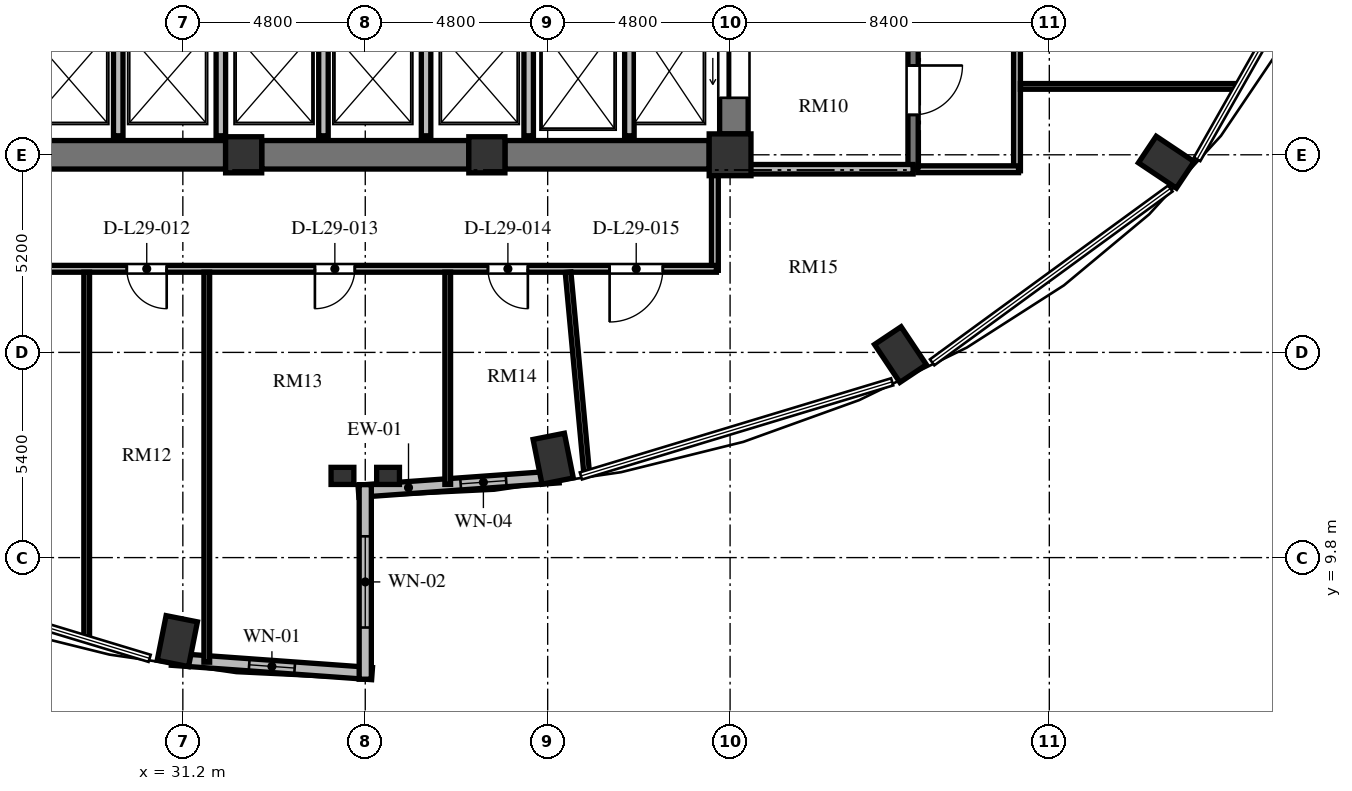
"""IFC4 building model, lengths in metres.
Left out: names, types, materials, properties, quantities, classifications, styles, units other than length and angle.
Written with IfcOpenShell. Run it as: python <this file> out.ifc"""

import sys

from ifc_helpers import new_model, si_unit, direction, frame, frame_2d, origin, origin_2d, place, context, subcontext, project, spatial, rectangle, extrude, element, fill, save


model = new_model("IFC4")
c1 = context("Model", 3, precision=1e-05, world=origin(), true_north=direction((0.0, 1.0)))
c2 = subcontext(c1, "Body", "Model", "MODEL_VIEW")
j1 = project(units=[si_unit("LENGTHUNIT", "METRE"), si_unit("PLANEANGLEUNIT", "RADIAN")], contexts=[c1])
p1 = place(None, origin())
s1 = spatial("IfcSite", under=j1, at=p1, CompositionType="ELEMENT")
p2 = place(p1, origin())
s2 = spatial("IfcBuilding", under=s1, at=p2, CompositionType="ELEMENT")
p3 = place(p2, frame((0.0, 0.0, 114.576)))
s3 = spatial("IfcBuildingStorey", under=s2, at=p3, CompositionType="ELEMENT", Elevation=114.576)
for number, where, z_axis, x_axis in (
    (1, (40.946, 12.403, 0.0), (0.0, 0.0, 1.0), (0.195, -0.981, 0.0)),
    (2, (50.084, 15.143, 0.0), (0.0, 0.0, 1.0), (0.556, -0.831, 0.0)),
    (3, (57.078, 20.205, 0.0), (0.0, 0.0, 1.0), (0.831, -0.556, 0.0)),
    (4, (31.054, 7.603, 0.0), (0.0, 0.0, 1.0), (-0.195, -0.981, 0.0)),
):
    element("IfcColumn", number, at=place(p3, frame(where, z_axis=z_axis, x_axis=x_axis)), inside=s3, PredefinedType="COLUMN", context=c2, shape_type="SweptSolid", body=[
        extrude(rectangle(XDim=1.2, YDim=0.84, at=origin_2d()), origin(), (0.0, 0.0, 1.0), 3.648),
    ])
for number, where, z_axis, x_axis in (
    (5, (32.8, 20.4, 0.0), (0.0, 0.0, 1.0), (1.0, 0.0, 0.0)),
    (6, (39.2, 20.4, 0.0), (0.0, 0.0, 1.0), (1.0, 0.0, 0.0)),
):
    element("IfcColumn", number, at=place(p3, frame(where, z_axis=z_axis, x_axis=x_axis)), inside=s3, PredefinedType="COLUMN", context=c2, shape_type="SweptSolid", body=[
        extrude(rectangle(XDim=0.95, YDim=0.95, at=origin_2d()), origin(), (0.0, 0.0, 1.0), 3.648),
    ])
p4 = place(p3, frame((45.6, 20.4, 0.0), z_axis=(0.0, 0.0, 1.0), x_axis=(1.0, 0.0, 0.0)))
e7 = element("IfcColumn", 7, at=p4, inside=s3, PredefinedType="COLUMN", context=c2, shape_type="SweptSolid", body=[
    extrude(rectangle(XDim=1.1, YDim=1.1, at=origin_2d()), origin(), (0.0, 0.0, 1.0), 3.648),
])
for number, where, z_axis, x_axis in (
    (8, (35.4, 11.95, 0.0), (0.0, 0.0, 1.0), (1.0, 0.0, 0.0)),
    (9, (36.6, 11.95, 0.0), (0.0, 0.0, 1.0), (1.0, 0.0, 0.0)),
):
    element("IfcColumn", number, at=place(p3, frame(where, z_axis=z_axis, x_axis=x_axis)), inside=s3, PredefinedType="PILASTER", context=c2, shape_type="SweptSolid", body=[
        extrude(rectangle(XDim=0.6, YDim=0.45, at=origin_2d()), origin(), (0.0, 0.0, 1.0), 3.648),
    ])
p5 = place(p3, frame((45.7, 20.95, 0.0), z_axis=(0.0, 0.0, 1.0), x_axis=(0.0, 1.0, 0.0)))
e10 = element("IfcWall", 10, at=p5, inside=s3, PredefinedType="SHEAR", context=c2, shape_type="SweptSolid", body=[
    extrude(rectangle(XDim=14.1, YDim=0.75, at=frame_2d((7.05, 0.0))), origin(), (0.0, 0.0, 1.0), 3.648),
])
p6 = place(p5, frame((11.75, 0.0, 0.0)))
e11 = element("IfcOpeningElement", 11, at=p6, cuts=e10, PredefinedType="OPENING", context=c2, shape_type="SweptSolid", body=[
    extrude(rectangle(XDim=1.4, YDim=2.3, at=frame_2d((0.7, 1.15))), frame((0.0, 0.385, 0.0), z_axis=(0.0, -1.0, 0.0), x_axis=(1.0, 0.0, 0.0)), (0.0, 0.0, 1.0), 0.77),
])
p7 = place(p5, frame((0.95, 0.0, 0.0)))
e12 = element("IfcOpeningElement", 12, at=p7, cuts=e10, PredefinedType="OPENING", context=c2, shape_type="SweptSolid", body=[
    extrude(rectangle(XDim=1.4, YDim=2.3, at=frame_2d((0.7, 1.15))), frame((0.0, 0.385, 0.0), z_axis=(0.0, -1.0, 0.0), x_axis=(1.0, 0.0, 0.0)), (0.0, 0.0, 1.0), 0.77),
])
p8 = place(p3, frame((26.95, 20.4, 0.0), z_axis=(0.0, 0.0, 1.0), x_axis=(1.0, 0.0, 0.0)))
e13 = element("IfcWall", 13, at=p8, inside=s3, PredefinedType="SHEAR", context=c2, shape_type="SweptSolid", body=[
    extrude(rectangle(XDim=5.375, YDim=0.75, at=frame_2d((2.688, 0.0))), origin(), (0.0, 0.0, 1.0), 3.648),
])
p9 = place(p3, frame((33.275, 20.4, 0.0), z_axis=(0.0, 0.0, 1.0), x_axis=(1.0, 0.0, 0.0)))
e14 = element("IfcWall", 14, at=p9, inside=s3, PredefinedType="SHEAR", context=c2, shape_type="SweptSolid", body=[
    extrude(rectangle(XDim=5.45, YDim=0.75, at=frame_2d((2.725, 0.0))), origin(), (0.0, 0.0, 1.0), 3.648),
])
p10 = place(p3, frame((39.675, 20.4, 0.0), z_axis=(0.0, 0.0, 1.0), x_axis=(1.0, 0.0, 0.0)))
e15 = element("IfcWall", 15, at=p10, inside=s3, PredefinedType="SHEAR", context=c2, shape_type="SweptSolid", body=[
    extrude(rectangle(XDim=5.375, YDim=0.75, at=frame_2d((2.688, 0.0))), origin(), (0.0, 0.0, 1.0), 3.648),
])
p11 = place(p3, frame((35.821, 11.547, 0.0), z_axis=(0.0, 0.0, 1.0), x_axis=(0.997432364291, 0.071614793619, 0.0)))
e16 = element("IfcWall", 16, at=p11, inside=s3, PredefinedType="SOLIDWALL", context=c2, shape_type="SweptSolid", body=[
    extrude(rectangle(XDim=5.284, YDim=0.32, at=frame_2d((2.642, 0.0))), origin(), (0.0, 0.0, 1.0), 3.428),
])
p12 = place(p11, frame((2.697, 0.0, 0.85)))
e17 = element("IfcOpeningElement", 17, at=p12, cuts=e16, PredefinedType="OPENING", context=c2, shape_type="SweptSolid", body=[
    extrude(rectangle(XDim=1.2, YDim=1.8, at=frame_2d((0.6, 0.9))), frame((0.0, 0.17, 0.0), z_axis=(0.0, -1.0, 0.0), x_axis=(1.0, 0.0, 0.0)), (0.0, 0.0, 1.0), 0.34),
])
p13 = place(p3, frame((30.909, 7.125, 0.0), z_axis=(0.0, 0.0, 1.0), x_axis=(0.997431890304, -0.071621394884, 0.0)))
e18 = element("IfcWall", 18, at=p13, inside=s3, PredefinedType="SOLIDWALL", context=c2, shape_type="SweptSolid", body=[
    extrude(rectangle(XDim=5.284, YDim=0.32, at=frame_2d((2.642, 0.0))), origin(), (0.0, 0.0, 1.0), 3.428),
])
p14 = place(p13, frame((2.042, 0.0, 0.85)))
e19 = element("IfcOpeningElement", 19, at=p14, cuts=e18, PredefinedType="OPENING", context=c2, shape_type="SweptSolid", body=[
    extrude(rectangle(XDim=1.2, YDim=2.2, at=frame_2d((0.6, 1.1))), frame((0.0, 0.17, 0.0), z_axis=(0.0, -1.0, 0.0), x_axis=(1.0, 0.0, 0.0)), (0.0, 0.0, 1.0), 0.34),
])
p15 = place(p3, frame((36.0, 6.6, 0.0), z_axis=(0.0, 0.0, 1.0), x_axis=(0.0, 1.0, 0.0)))
e20 = element("IfcWall", 20, at=p15, inside=s3, PredefinedType="SOLIDWALL", context=c2, shape_type="SweptSolid", body=[
    extrude(rectangle(XDim=5.12, YDim=0.32, at=frame_2d((2.56, 0.0))), origin(), (0.0, 0.0, 1.0), 3.428),
])
p16 = place(p15, frame((1.36, 0.0, 0.84)))
e21 = element("IfcOpeningElement", 21, at=p16, cuts=e20, PredefinedType="OPENING", context=c2, shape_type="SweptSolid", body=[
    extrude(rectangle(XDim=2.4, YDim=2.04, at=frame_2d((1.2, 1.02))), frame((0.0, 0.17, 0.0), z_axis=(0.0, -1.0, 0.0), x_axis=(1.0, 0.0, 0.0)), (0.0, 0.0, 1.0), 0.34),
])
p17 = place(p3, frame((42.95, 20.9, 0.0), z_axis=(0.0, 0.0, 1.0), x_axis=(0.0, 1.0, 0.0)))
e22 = element("IfcWall", 22, at=p17, inside=s3, PredefinedType="SOLIDWALL", context=c2, shape_type="SweptSolid", body=[
    extrude(rectangle(XDim=3.2, YDim=0.25, at=frame_2d((1.6, 0.0))), origin(), (0.0, 0.0, 1.0), 3.428),
])
for number, where, z_axis, x_axis in (
    (23, (29.5, 20.9, 0.0), (0.0, 0.0, 1.0), (0.0, 1.0, 0.0)),
    (24, (32.2, 20.9, 0.0), (0.0, 0.0, 1.0), (0.0, 1.0, 0.0)),
    (25, (34.9, 20.9, 0.0), (0.0, 0.0, 1.0), (0.0, 1.0, 0.0)),
    (26, (37.6, 20.9, 0.0), (0.0, 0.0, 1.0), (0.0, 1.0, 0.0)),
    (27, (40.3, 20.9, 0.0), (0.0, 0.0, 1.0), (0.0, 1.0, 0.0)),
):
    element("IfcWall", number, at=place(p3, frame(where, z_axis=z_axis, x_axis=x_axis)), inside=s3, PredefinedType="SOLIDWALL", context=c2, shape_type="SweptSolid", body=[
        extrude(rectangle(XDim=2.8, YDim=0.25, at=frame_2d((1.4, 0.0))), origin(), (0.0, 0.0, 1.0), 3.428),
    ])
p18 = place(p3, frame((50.415, 35.845, 0.0), z_axis=(0.0, 0.0, 1.0), x_axis=(0.0, -1.0, 0.0)))
e28 = element("IfcWall", 28, at=p18, inside=s3, PredefinedType="SHEAR", context=c2, shape_type="SweptSolid", body=[
    extrude(rectangle(XDim=15.825, YDim=0.27, at=frame_2d((7.913, 0.0))), origin(), (0.0, 0.0, 1.0), 3.648),
])
p19 = place(p18, frame((4.445, 0.0, 0.0)))
e29 = element("IfcOpeningElement", 29, at=p19, cuts=e28, PredefinedType="OPENING", context=c2, shape_type="SweptSolid", body=[
    extrude(rectangle(XDim=1.2, YDim=2.15, at=frame_2d((0.6, 1.075))), frame((0.0, 0.145, 0.0), z_axis=(0.0, -1.0, 0.0), x_axis=(1.0, 0.0, 0.0)), (0.0, 0.0, 1.0), 0.29),
])
p20 = place(p18, frame((1.295, 0.0, 0.0)))
e30 = element("IfcOpeningElement", 30, at=p20, cuts=e28, PredefinedType="OPENING", context=c2, shape_type="SweptSolid", body=[
    extrude(rectangle(XDim=1.3, YDim=2.2, at=frame_2d((0.65, 1.1))), frame((0.0, 0.145, 0.0), z_axis=(0.0, -1.0, 0.0), x_axis=(1.0, 0.0, 0.0)), (0.0, 0.0, 1.0), 0.29),
])
p21 = place(p18, frame((13.095, 0.0, 0.0)))
e31 = element("IfcOpeningElement", 31, at=p21, cuts=e28, PredefinedType="OPENING", context=c2, shape_type="SweptSolid", body=[
    extrude(rectangle(XDim=1.3, YDim=2.2, at=frame_2d((0.65, 1.1))), frame((0.0, 0.145, 0.0), z_axis=(0.0, -1.0, 0.0), x_axis=(1.0, 0.0, 0.0)), (0.0, 0.0, 1.0), 0.29),
])
p22 = place(p3, frame((45.7, 20.02, 0.0), z_axis=(0.0, 0.0, 1.0), x_axis=(1.0, 0.0, 0.0)))
e32 = element("IfcWall", 32, at=p22, inside=s3, PredefinedType="SOLIDWALL", context=c2, shape_type="SweptSolid", body=[
    extrude(rectangle(XDim=4.715, YDim=0.25, at=frame_2d((2.357, 0.0))), origin(), (0.0, 0.0, 1.0), 3.428),
])
p23 = place(p3, frame((53.15, 26.64, 0.0), z_axis=(0.0, 0.0, 1.0), x_axis=(0.0, -1.0, 0.0)))
e33 = element("IfcWall", 33, at=p23, inside=s3, PredefinedType="PARTITIONING", context=c2, shape_type="SweptSolid", body=[
    extrude(rectangle(XDim=6.66, YDim=0.18, at=frame_2d((3.33, 0.0))), origin(), (0.0, 0.0, 1.0), 3.428),
])
p24 = place(p3, frame((53.19, 20.02, 0.0), z_axis=(0.0, 0.0, 1.0), x_axis=(-1.0, 0.0, 0.0)))
e34 = element("IfcWall", 34, at=p24, inside=s3, PredefinedType="PARTITIONING", context=c2, shape_type="SweptSolid", body=[
    extrude(rectangle(XDim=2.65, YDim=0.18, at=frame_2d((1.325, 0.0))), origin(), (0.0, 0.0, 1.0), 3.428),
])
p25 = place(p3, frame((45.2, 19.91, 0.0), z_axis=(0.0, 0.0, 1.0), x_axis=(0.0, -1.0, 0.0)))
e35 = element("IfcWall", 35, at=p25, inside=s3, PredefinedType="PARTITIONING", context=c2, shape_type="SweptSolid", body=[
    extrude(rectangle(XDim=2.55, YDim=0.18, at=frame_2d((1.275, 0.0))), origin(), (0.0, 0.0, 1.0), 3.428),
])
p26 = place(p3, frame((45.24, 17.4, 0.0), z_axis=(0.0, 0.0, 1.0), x_axis=(-1.0, 0.0, 0.0)))
e36 = element("IfcWall", 36, at=p26, inside=s3, PredefinedType="PARTITIONING", context=c2, shape_type="SweptSolid", body=[
    extrude(rectangle(XDim=21.93, YDim=0.18, at=frame_2d((10.965, 0.0))), origin(), (0.0, 0.0, 1.0), 3.053),
])
p27 = place(p26, frame((18.391, 0.0, 0.0)))
e37 = element("IfcOpeningElement", 37, at=p27, cuts=e36, PredefinedType="OPENING", context=c2, shape_type="SweptSolid", body=[
    extrude(rectangle(XDim=1.4, YDim=2.2, at=frame_2d((0.7, 1.1))), frame((0.0, 0.1, 0.0), z_axis=(0.0, -1.0, 0.0), x_axis=(1.0, 0.0, 0.0)), (0.0, 0.0, 1.0), 0.2),
])
p28 = place(p26, frame((14.465, 0.0, 0.0)))
e38 = element("IfcOpeningElement", 38, at=p28, cuts=e36, PredefinedType="OPENING", context=c2, shape_type="SweptSolid", body=[
    extrude(rectangle(XDim=1.05, YDim=2.15, at=frame_2d((0.525, 1.075))), frame((0.0, 0.1, 0.0), z_axis=(0.0, -1.0, 0.0), x_axis=(1.0, 0.0, 0.0)), (0.0, 0.0, 1.0), 0.2),
])
p29 = place(p26, frame((9.515, 0.0, 0.0)))
e39 = element("IfcOpeningElement", 39, at=p29, cuts=e36, PredefinedType="OPENING", context=c2, shape_type="SweptSolid", body=[
    extrude(rectangle(XDim=1.05, YDim=2.15, at=frame_2d((0.525, 1.075))), frame((0.0, 0.1, 0.0), z_axis=(0.0, -1.0, 0.0), x_axis=(1.0, 0.0, 0.0)), (0.0, 0.0, 1.0), 0.2),
])
p30 = place(p26, frame((4.961, 0.0, 0.0)))
e40 = element("IfcOpeningElement", 40, at=p30, cuts=e36, PredefinedType="OPENING", context=c2, shape_type="SweptSolid", body=[
    extrude(rectangle(XDim=1.05, YDim=2.15, at=frame_2d((0.525, 1.075))), frame((0.0, 0.1, 0.0), z_axis=(0.0, -1.0, 0.0), x_axis=(1.0, 0.0, 0.0)), (0.0, 0.0, 1.0), 0.2),
])
p31 = place(p26, frame((1.41, 0.0, 0.0)))
e41 = element("IfcOpeningElement", 41, at=p31, cuts=e36, PredefinedType="OPENING", context=c2, shape_type="SweptSolid", body=[
    extrude(rectangle(XDim=1.4, YDim=2.2, at=frame_2d((0.7, 1.1))), frame((0.0, 0.1, 0.0), z_axis=(0.0, -1.0, 0.0), x_axis=(1.0, 0.0, 0.0)), (0.0, 0.0, 1.0), 0.2),
])
p32 = place(p3, frame((53.24, 22.2, 0.0), z_axis=(0.0, 0.0, 1.0), x_axis=(1.0, 0.0, 0.0)))
e42 = element("IfcWall", 42, at=p32, inside=s3, PredefinedType="PARTITIONING", context=c2, shape_type="SweptSolid", body=[
    extrude(rectangle(XDim=5.731, YDim=0.15, at=frame_2d((2.866, 0.0))), origin(), (0.0, 0.0, 1.0), 3.428),
])
p33 = place(p3, frame((28.67, 7.664, 0.0), z_axis=(0.0, 0.0, 1.0), x_axis=(0.0, 1.0, 0.0)))
e43 = element("IfcWall", 43, at=p33, inside=s3, PredefinedType="PARTITIONING", context=c2, shape_type="SweptSolid", body=[
    extrude(rectangle(XDim=9.646, YDim=0.15, at=frame_2d((4.823, 0.0))), origin(), (0.0, 0.0, 1.0), 3.428),
])
p34 = place(p3, frame((31.83, 7.048, 0.0), z_axis=(0.0, 0.0, 1.0), x_axis=(0.0, 1.0, 0.0)))
e44 = element("IfcWall", 44, at=p34, inside=s3, PredefinedType="PARTITIONING", context=c2, shape_type="SweptSolid", body=[
    extrude(rectangle(XDim=10.262, YDim=0.15, at=frame_2d((5.131, 0.0))), origin(), (0.0, 0.0, 1.0), 2.813),
])
p35 = place(p3, frame((38.17, 11.727, 0.0), z_axis=(0.0, 0.0, 1.0), x_axis=(0.0, 1.0, 0.0)))
e45 = element("IfcWall", 45, at=p35, inside=s3, PredefinedType="PARTITIONING", context=c2, shape_type="SweptSolid", body=[
    extrude(rectangle(XDim=5.583, YDim=0.15, at=frame_2d((2.792, 0.0))), origin(), (0.0, 0.0, 1.0), 3.428),
])
p36 = place(p3, frame((41.829, 11.995, 0.0), z_axis=(0.0, 0.0, 1.0), x_axis=(-0.092106681554, 0.995749144721, 0.0)))
e46 = element("IfcWall", 46, at=p36, inside=s3, PredefinedType="PARTITIONING", context=c2, shape_type="SweptSolid", body=[
    extrude(rectangle(XDim=5.338, YDim=0.15, at=frame_2d((2.669, 0.0))), origin(), (0.0, 0.0, 1.0), 3.428),
])
p37 = place(p12, origin())
e47 = element("IfcWindow", 47, at=p37, inside=s3, PartitioningType="SINGLE_PANEL", PredefinedType="WINDOW", context=c2, shape_type="SweptSolid", body=[
    extrude(rectangle(XDim=1.2, YDim=1.8, at=frame_2d((0.6, 0.9))), frame((0.0, 0.03, 0.0), z_axis=(0.0, -1.0, 0.0), x_axis=(1.0, 0.0, 0.0)), (0.0, 0.0, 1.0), 0.06),
])
fill(e17, e47)
p38 = place(p14, origin())
e48 = element("IfcWindow", 48, at=p38, inside=s3, PartitioningType="SINGLE_PANEL", PredefinedType="WINDOW", context=c2, shape_type="SweptSolid", body=[
    extrude(rectangle(XDim=1.2, YDim=2.2, at=frame_2d((0.6, 1.1))), frame((0.0, 0.03, 0.0), z_axis=(0.0, -1.0, 0.0), x_axis=(1.0, 0.0, 0.0)), (0.0, 0.0, 1.0), 0.06),
])
fill(e19, e48)
p39 = place(p16, origin())
e49 = element("IfcWindow", 49, at=p39, inside=s3, PartitioningType="SINGLE_PANEL", PredefinedType="WINDOW", context=c2, shape_type="SweptSolid", body=[
    extrude(rectangle(XDim=2.4, YDim=2.04, at=frame_2d((1.2, 1.02))), frame((0.0, 0.03, 0.0), z_axis=(0.0, -1.0, 0.0), x_axis=(1.0, 0.0, 0.0)), (0.0, 0.0, 1.0), 0.06),
])
fill(e21, e49)
p40 = place(p7, origin())
e50 = element("IfcDoor", 50, at=p40, inside=s3, OperationType="SLIDING_TO_LEFT", PredefinedType="DOOR", context=c2, shape_type="SweptSolid", body=[
    extrude(rectangle(XDim=1.4, YDim=2.3, at=frame_2d((0.7, 1.15))), frame((0.0, 0.025, 0.0), z_axis=(0.0, -1.0, 0.0), x_axis=(1.0, 0.0, 0.0)), (0.0, 0.0, 1.0), 0.05),
])
fill(e12, e50)
p41 = place(p21, origin())
e51 = element("IfcDoor", 51, at=p41, inside=s3, OperationType="SINGLE_SWING_LEFT", PredefinedType="DOOR", context=c2, shape_type="SweptSolid", body=[
    extrude(rectangle(XDim=1.3, YDim=2.2, at=frame_2d((0.65, 1.1))), frame((0.0, 0.025, 0.0), z_axis=(0.0, -1.0, 0.0), x_axis=(1.0, 0.0, 0.0)), (0.0, 0.0, 1.0), 0.05),
])
fill(e31, e51)
p42 = place(p28, origin())
e52 = element("IfcDoor", 52, at=p42, inside=s3, OperationType="SINGLE_SWING_LEFT", PredefinedType="DOOR", context=c2, shape_type="SweptSolid", body=[
    extrude(rectangle(XDim=1.05, YDim=2.15, at=frame_2d((0.525, 1.075))), frame((0.0, 0.025, 0.0), z_axis=(0.0, -1.0, 0.0), x_axis=(1.0, 0.0, 0.0)), (0.0, 0.0, 1.0), 0.05),
])
fill(e38, e52)
p43 = place(p29, origin())
e53 = element("IfcDoor", 53, at=p43, inside=s3, OperationType="SINGLE_SWING_RIGHT", PredefinedType="DOOR", context=c2, shape_type="SweptSolid", body=[
    extrude(rectangle(XDim=1.05, YDim=2.15, at=frame_2d((0.525, 1.075))), frame((0.0, 0.025, 0.0), z_axis=(0.0, -1.0, 0.0), x_axis=(1.0, 0.0, 0.0)), (0.0, 0.0, 1.0), 0.05),
])
fill(e39, e53)
p44 = place(p30, origin())
e54 = element("IfcDoor", 54, at=p44, inside=s3, OperationType="SINGLE_SWING_LEFT", PredefinedType="DOOR", context=c2, shape_type="SweptSolid", body=[
    extrude(rectangle(XDim=1.05, YDim=2.15, at=frame_2d((0.525, 1.075))), frame((0.0, 0.025, 0.0), z_axis=(0.0, -1.0, 0.0), x_axis=(1.0, 0.0, 0.0)), (0.0, 0.0, 1.0), 0.05),
])
fill(e40, e54)
p45 = place(p31, origin())
e55 = element("IfcDoor", 55, at=p45, inside=s3, OperationType="SINGLE_SWING_RIGHT", PredefinedType="DOOR", context=c2, shape_type="SweptSolid", body=[
    extrude(rectangle(XDim=1.4, YDim=2.2, at=frame_2d((0.7, 1.1))), frame((0.0, 0.025, 0.0), z_axis=(0.0, -1.0, 0.0), x_axis=(1.0, 0.0, 0.0)), (0.0, 0.0, 1.0), 0.05),
])
fill(e41, e55)
save(model, sys.argv[1])
